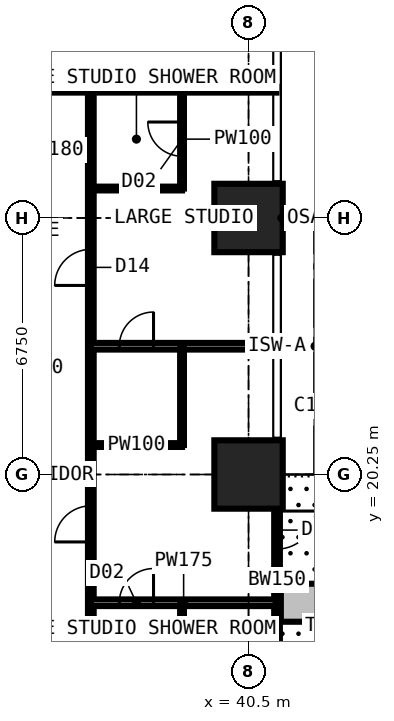
"""IFC4 building model, lengths in metres.
Left out: names, types, materials, properties, quantities, classifications, styles, units other than length and angle.
Written with IfcOpenShell. Run it as: python <this file> out.ifc"""

import sys

from ifc_helpers import new_model, si_unit, direction, frame, frame_2d, origin, origin_2d, place, context, subcontext, project, spatial, rectangle, extrude, element, fill, save


model = new_model("IFC4")
c1 = context("Model", 3, precision=1e-05, world=origin(), true_north=direction((0.0, 1.0)))
c2 = subcontext(c1, "Body", "Model", "MODEL_VIEW")
j1 = project(units=[si_unit("LENGTHUNIT", "METRE"), si_unit("PLANEANGLEUNIT", "RADIAN")], contexts=[c1])
p1 = place(None, origin())
s1 = spatial("IfcSite", under=j1, at=p1, CompositionType="ELEMENT")
p2 = place(p1, origin())
s2 = spatial("IfcBuilding", under=s1, at=p2, CompositionType="ELEMENT")
p3 = place(p2, frame((0.0, 0.0, 68.4)))
s3 = spatial("IfcBuildingStorey", under=s2, at=p3, CompositionType="ELEMENT", Elevation=68.4)
for number, where, z_axis, x_axis in (
    (1, (40.5, 20.25, 0.0), (0.0, 0.0, 1.0), (1.0, 0.0, 0.0)),
    (2, (40.5, 27.0, 0.0), (0.0, 0.0, 1.0), (1.0, 0.0, 0.0)),
):
    element("IfcColumn", number, at=place(p3, frame(where, z_axis=z_axis, x_axis=x_axis)), inside=s3, PredefinedType="COLUMN", context=c2, shape_type="SweptSolid", body=[
        extrude(rectangle(XDim=1.8, YDim=1.8, at=origin_2d()), origin(), (0.0, 0.0, 1.0), 3.6),
    ])
p4 = place(p3, frame((41.25, 20.25, 0.0), z_axis=(0.0, 0.0, 1.0), x_axis=(0.0, -1.0, 0.0)))
e3 = element("IfcWall", 3, at=p4, inside=s3, PredefinedType="SOLIDWALL", context=c2, shape_type="SweptSolid", body=[
    extrude(rectangle(XDim=6.75, YDim=0.15, at=frame_2d((3.375, 0.0))), origin(), (0.0, 0.0, 1.0), 3.375),
])
p5 = place(p4, frame((0.962, 0.0, 0.0)))
e4 = element("IfcOpeningElement", 4, at=p5, cuts=e3, PredefinedType="OPENING", context=c2, shape_type="SweptSolid", body=[
    extrude(rectangle(XDim=1.0, YDim=2.2, at=frame_2d((0.5, 1.1))), frame((0.0, 0.085, 0.0), z_axis=(0.0, -1.0, 0.0), x_axis=(1.0, 0.0, 0.0)), (0.0, 0.0, 1.0), 0.17),
])
p6 = place(p4, frame((2.025, 0.0, 0.9)))
e5 = element("IfcOpeningElement", 5, at=p6, cuts=e3, PredefinedType="OPENING", context=c2, shape_type="SweptSolid", body=[
    extrude(rectangle(XDim=1.2, YDim=1.8, at=frame_2d((0.6, 0.9))), frame((0.0, 0.085, 0.0), z_axis=(0.0, -1.0, 0.0), x_axis=(1.0, 0.0, 0.0)), (0.0, 0.0, 1.0), 0.17),
])
p7 = place(p4, frame((4.788, 0.0, 0.0)))
e6 = element("IfcOpeningElement", 6, at=p7, cuts=e3, PredefinedType="OPENING", context=c2, shape_type="SweptSolid", body=[
    extrude(rectangle(XDim=1.0, YDim=2.2, at=frame_2d((0.5, 1.1))), frame((0.0, 0.085, 0.0), z_axis=(0.0, -1.0, 0.0), x_axis=(1.0, 0.0, 0.0)), (0.0, 0.0, 1.0), 0.17),
])
p8 = place(p4, frame((3.525, 0.0, 0.9)))
e7 = element("IfcOpeningElement", 7, at=p8, cuts=e3, PredefinedType="OPENING", context=c2, shape_type="SweptSolid", body=[
    extrude(rectangle(XDim=1.2, YDim=1.8, at=frame_2d((0.6, 0.9))), frame((0.0, 0.085, 0.0), z_axis=(0.0, -1.0, 0.0), x_axis=(1.0, 0.0, 0.0)), (0.0, 0.0, 1.0), 0.17),
])
p9 = place(p3, frame((41.35, 16.875, 0.0), z_axis=(0.0, 0.0, 1.0), x_axis=(1.0, 0.0, 0.0)))
e8 = element("IfcWall", 8, at=p9, inside=s3, PredefinedType="USERDEFINED", context=c2, shape_type="SweptSolid", body=[
    extrude(rectangle(XDim=2.2, YDim=1.0, at=frame_2d((1.1, 0.0))), origin(), (0.0, 0.0, 1.0), 0.9),
])
p10 = place(p3, frame((30.375, 30.375, 0.0), z_axis=(0.0, 0.0, 1.0), x_axis=(1.0, 0.0, 0.0)))
e9 = element("IfcWall", 9, at=p10, inside=s3, PredefinedType="PARTITIONING", context=c2, shape_type="SweptSolid", body=[
    extrude(rectangle(XDim=10.859, YDim=0.15, at=frame_2d((5.429, 0.0))), origin(), (0.0, 0.0, 1.0), 3.375),
])
p11 = place(p3, frame((36.35, 6.75, 0.0), z_axis=(0.0, 0.0, 1.0), x_axis=(0.0, 1.0, 0.0)))
e10 = element("IfcWall", 10, at=p11, inside=s3, PredefinedType="PARTITIONING", context=c2, shape_type="SweptSolid", body=[
    extrude(rectangle(XDim=23.625, YDim=0.15, at=frame_2d((11.812, 0.0))), origin(), (0.0, 0.0, 1.0), 3.375),
])
p12 = place(p11, frame((0.2, 0.0, 0.0)))
e11 = element("IfcOpeningElement", 11, at=p12, cuts=e10, PredefinedType="OPENING", context=c2, shape_type="SweptSolid", body=[
    extrude(rectangle(XDim=0.95, YDim=2.2, at=frame_2d((0.475, 1.1))), frame((0.0, 0.085, 0.0), z_axis=(0.0, -1.0, 0.0), x_axis=(1.0, 0.0, 0.0)), (0.0, 0.0, 1.0), 0.17),
])
p13 = place(p11, frame((18.475, 0.0, 0.0)))
e12 = element("IfcOpeningElement", 12, at=p13, cuts=e10, PredefinedType="OPENING", context=c2, shape_type="SweptSolid", body=[
    extrude(rectangle(XDim=0.95, YDim=2.2, at=frame_2d((0.475, 1.1))), frame((0.0, 0.085, 0.0), z_axis=(0.0, -1.0, 0.0), x_axis=(1.0, 0.0, 0.0)), (0.0, 0.0, 1.0), 0.17),
])
p14 = place(p11, frame((11.725, 0.0, 0.0)))
e13 = element("IfcOpeningElement", 13, at=p14, cuts=e10, PredefinedType="OPENING", context=c2, shape_type="SweptSolid", body=[
    extrude(rectangle(XDim=0.95, YDim=2.2, at=frame_2d((0.475, 1.1))), frame((0.0, 0.085, 0.0), z_axis=(0.0, -1.0, 0.0), x_axis=(1.0, 0.0, 0.0)), (0.0, 0.0, 1.0), 0.17),
])
p15 = place(p11, frame((4.975, 0.0, 0.0)))
e14 = element("IfcOpeningElement", 14, at=p15, cuts=e10, PredefinedType="OPENING", context=c2, shape_type="SweptSolid", body=[
    extrude(rectangle(XDim=0.95, YDim=2.2, at=frame_2d((0.475, 1.1))), frame((0.0, 0.085, 0.0), z_axis=(0.0, -1.0, 0.0), x_axis=(1.0, 0.0, 0.0)), (0.0, 0.0, 1.0), 0.17),
])
p16 = place(p3, frame((36.35, 16.875, 0.0), z_axis=(0.0, 0.0, 1.0), x_axis=(1.0, 0.0, 0.0)))
e15 = element("IfcWall", 15, at=p16, inside=s3, PredefinedType="PARTITIONING", context=c2, shape_type="SweptSolid", body=[
    extrude(rectangle(XDim=4.884, YDim=0.175, at=frame_2d((2.442, 0.0))), origin(), (0.0, 0.0, 1.0), 3.375),
])
p17 = place(p16, frame((0.75, 0.0, 0.0)))
e16 = element("IfcOpeningElement", 16, at=p17, cuts=e15, PredefinedType="OPENING", context=c2, shape_type="SweptSolid", body=[
    extrude(rectangle(XDim=0.9, YDim=2.2, at=frame_2d((0.45, 1.1))), frame((0.0, 0.097, 0.0), z_axis=(0.0, -1.0, 0.0), x_axis=(1.0, 0.0, 0.0)), (0.0, 0.0, 1.0), 0.195),
])
p18 = place(p3, frame((36.35, 21.025, 0.0), z_axis=(0.0, 0.0, 1.0), x_axis=(1.0, 0.0, 0.0)))
e17 = element("IfcWall", 17, at=p18, inside=s3, PredefinedType="PARTITIONING", context=c2, shape_type="SweptSolid", body=[
    extrude(rectangle(XDim=2.4, YDim=0.1, at=frame_2d((1.2, 0.0))), origin(), (0.0, 0.0, 1.0), 3.375),
])
p19 = place(p3, frame((36.35, 23.625, 0.0), z_axis=(0.0, 0.0, 1.0), x_axis=(1.0, 0.0, 0.0)))
e18 = element("IfcWall", 18, at=p19, inside=s3, PredefinedType="PARTITIONING", context=c2, shape_type="SweptSolid", body=[
    extrude(rectangle(XDim=4.884, YDim=0.175, at=frame_2d((2.442, 0.0))), origin(), (0.0, 0.0, 1.0), 3.375),
])
p20 = place(p19, frame((0.75, 0.0, 0.0)))
e19 = element("IfcOpeningElement", 19, at=p20, cuts=e18, PredefinedType="OPENING", context=c2, shape_type="SweptSolid", body=[
    extrude(rectangle(XDim=0.9, YDim=2.2, at=frame_2d((0.45, 1.1))), frame((0.0, 0.097, 0.0), z_axis=(0.0, -1.0, 0.0), x_axis=(1.0, 0.0, 0.0)), (0.0, 0.0, 1.0), 0.195),
])
p21 = place(p3, frame((36.35, 27.775, 0.0), z_axis=(0.0, 0.0, 1.0), x_axis=(1.0, 0.0, 0.0)))
e20 = element("IfcWall", 20, at=p21, inside=s3, PredefinedType="PARTITIONING", context=c2, shape_type="SweptSolid", body=[
    extrude(rectangle(XDim=2.4, YDim=0.1, at=frame_2d((1.2, 0.0))), origin(), (0.0, 0.0, 1.0), 3.375),
])
for number, where, z_axis, x_axis in (
    (21, (38.75, 14.275, 0.0), (0.0, 0.0, 1.0), (0.0, 1.0, 0.0)),
    (22, (38.75, 21.025, 0.0), (0.0, 0.0, 1.0), (0.0, 1.0, 0.0)),
):
    element("IfcWall", number, at=place(p3, frame(where, z_axis=z_axis, x_axis=x_axis)), inside=s3, PredefinedType="PARTITIONING", context=c2, shape_type="SweptSolid", body=[
        extrude(rectangle(XDim=2.6, YDim=0.1, at=frame_2d((1.3, 0.0))), origin(), (0.0, 0.0, 1.0), 3.375),
    ])
p22 = place(p3, frame((38.75, 27.775, 0.0), z_axis=(0.0, 0.0, 1.0), x_axis=(0.0, 1.0, 0.0)))
e23 = element("IfcWall", 23, at=p22, inside=s3, PredefinedType="PARTITIONING", context=c2, shape_type="SweptSolid", body=[
    extrude(rectangle(XDim=2.6, YDim=0.1, at=frame_2d((1.3, 0.0))), origin(), (0.0, 0.0, 1.0), 3.375),
])
p23 = place(p22, frame((0.85, 0.0, 0.0)))
e24 = element("IfcOpeningElement", 24, at=p23, cuts=e23, PredefinedType="OPENING", context=c2, shape_type="SweptSolid", body=[
    extrude(rectangle(XDim=0.9, YDim=2.2, at=frame_2d((0.45, 1.1))), frame((0.0, 0.06, 0.0), z_axis=(0.0, -1.0, 0.0), x_axis=(1.0, 0.0, 0.0)), (0.0, 0.0, 1.0), 0.12),
])
p24 = place(p5, origin())
e25 = element("IfcDoor", 25, at=p24, inside=s3, OperationType="SINGLE_SWING_LEFT", PredefinedType="DOOR", context=c2, shape_type="SweptSolid", body=[
    extrude(rectangle(XDim=1.0, YDim=2.2, at=frame_2d((0.5, 1.1))), frame((0.0, 0.025, 0.0), z_axis=(0.0, -1.0, 0.0), x_axis=(1.0, 0.0, 0.0)), (0.0, 0.0, 1.0), 0.05),
])
fill(e4, e25)
p25 = place(p6, origin())
e26 = element("IfcWindow", 26, at=p25, inside=s3, PartitioningType="SINGLE_PANEL", PredefinedType="WINDOW", context=c2, shape_type="SweptSolid", body=[
    extrude(rectangle(XDim=1.2, YDim=1.8, at=frame_2d((0.6, 0.9))), frame((0.0, 0.03, 0.0), z_axis=(0.0, -1.0, 0.0), x_axis=(1.0, 0.0, 0.0)), (0.0, 0.0, 1.0), 0.06),
])
fill(e5, e26)
p26 = place(p8, origin())
e27 = element("IfcWindow", 27, at=p26, inside=s3, PartitioningType="SINGLE_PANEL", PredefinedType="WINDOW", context=c2, shape_type="SweptSolid", body=[
    extrude(rectangle(XDim=1.2, YDim=1.8, at=frame_2d((0.6, 0.9))), frame((0.0, 0.03, 0.0), z_axis=(0.0, -1.0, 0.0), x_axis=(1.0, 0.0, 0.0)), (0.0, 0.0, 1.0), 0.06),
])
fill(e7, e27)
p27 = place(p13, origin())
e28 = element("IfcDoor", 28, at=p27, inside=s3, OperationType="SINGLE_SWING_LEFT", PredefinedType="DOOR", context=c2, shape_type="SweptSolid", body=[
    extrude(rectangle(XDim=0.95, YDim=2.2, at=frame_2d((0.475, 1.1))), frame((0.0, 0.025, 0.0), z_axis=(0.0, -1.0, 0.0), x_axis=(1.0, 0.0, 0.0)), (0.0, 0.0, 1.0), 0.05),
])
fill(e12, e28)
p28 = place(p23, origin())
e29 = element("IfcDoor", 29, at=p28, inside=s3, OperationType="SINGLE_SWING_RIGHT", PredefinedType="DOOR", context=c2, shape_type="SweptSolid", body=[
    extrude(rectangle(XDim=0.9, YDim=2.2, at=frame_2d((0.45, 1.1))), frame((0.0, 0.025, 0.0), z_axis=(0.0, -1.0, 0.0), x_axis=(1.0, 0.0, 0.0)), (0.0, 0.0, 1.0), 0.05),
])
fill(e24, e29)
p29 = place(p14, origin())
e30 = element("IfcDoor", 30, at=p29, inside=s3, OperationType="SINGLE_SWING_LEFT", PredefinedType="DOOR", context=c2, shape_type="SweptSolid", body=[
    extrude(rectangle(XDim=0.95, YDim=2.2, at=frame_2d((0.475, 1.1))), frame((0.0, 0.025, 0.0), z_axis=(0.0, -1.0, 0.0), x_axis=(1.0, 0.0, 0.0)), (0.0, 0.0, 1.0), 0.05),
])
fill(e13, e30)
p30 = place(p20, origin())
e31 = element("IfcDoor", 31, at=p30, inside=s3, OperationType="SINGLE_SWING_RIGHT", PredefinedType="DOOR", context=c2, shape_type="SweptSolid", body=[
    extrude(rectangle(XDim=0.9, YDim=2.2, at=frame_2d((0.45, 1.1))), frame((0.0, 0.025, 0.0), z_axis=(0.0, -1.0, 0.0), x_axis=(1.0, 0.0, 0.0)), (0.0, 0.0, 1.0), 0.05),
])
fill(e19, e31)
p31 = place(p17, origin())
e32 = element("IfcDoor", 32, at=p31, inside=s3, OperationType="SINGLE_SWING_RIGHT", PredefinedType="DOOR", context=c2, shape_type="SweptSolid", body=[
    extrude(rectangle(XDim=0.9, YDim=2.2, at=frame_2d((0.45, 1.1))), frame((0.0, 0.025, 0.0), z_axis=(0.0, -1.0, 0.0), x_axis=(1.0, 0.0, 0.0)), (0.0, 0.0, 1.0), 0.05),
])
fill(e16, e32)
save(model, sys.argv[1])
